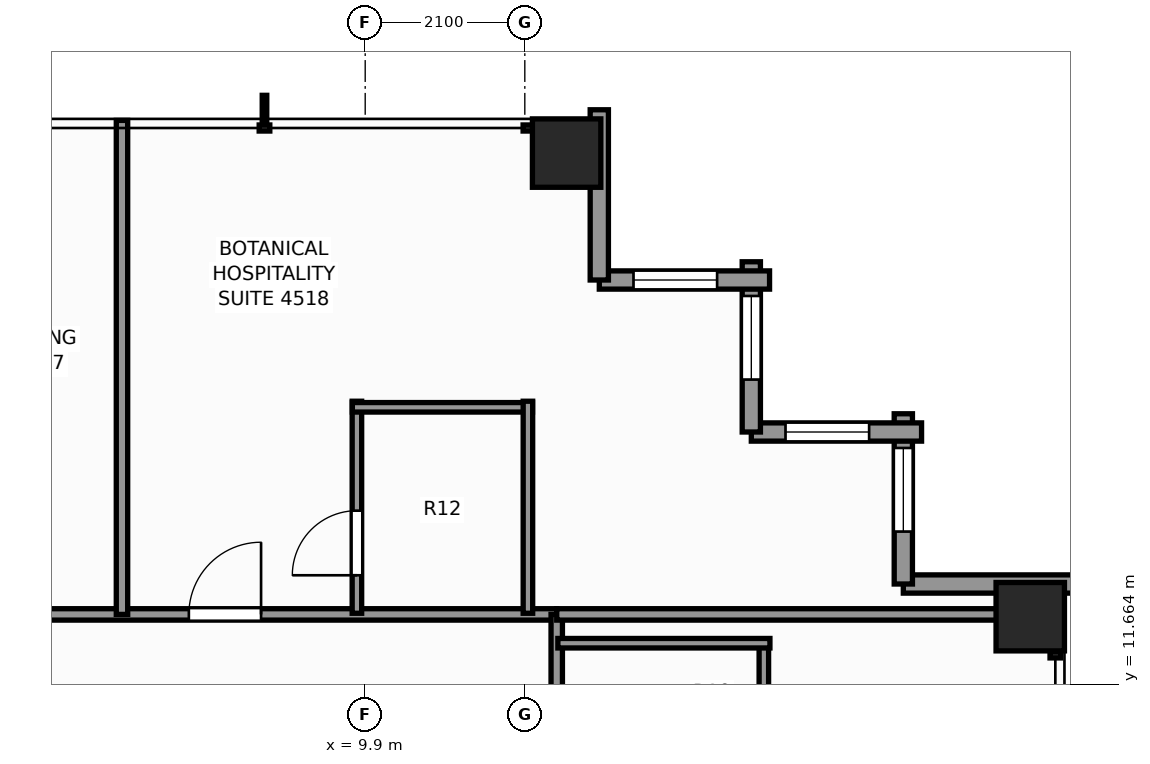
"""IFC4 building model, lengths in metres.
Left out: names, types, materials, properties, quantities, classifications, styles, units other than length and angle.
Written with IfcOpenShell. Run it as: python <this file> out.ifc"""

import sys

from ifc_helpers import new_model, si_unit, direction, frame, frame_2d, origin, origin_2d, place, context, subcontext, project, spatial, rectangle, extrude, element, fill, save


model = new_model("IFC4")
c1 = context("Model", 3, precision=1e-05, world=origin(), true_north=direction((0.0, 1.0)))
c2 = subcontext(c1, "Body", "Model", "MODEL_VIEW")
j1 = project(units=[si_unit("LENGTHUNIT", "METRE"), si_unit("PLANEANGLEUNIT", "RADIAN")], contexts=[c1])
p1 = place(None, origin())
s1 = spatial("IfcSite", under=j1, at=p1, CompositionType="ELEMENT")
p2 = place(p1, origin())
s2 = spatial("IfcBuilding", under=s1, at=p2, CompositionType="ELEMENT")
p3 = place(p2, frame((0.0, 0.0, 156.9)))
s3 = spatial("IfcBuildingStorey", under=s2, at=p3, CompositionType="ELEMENT", Elevation=156.9)
for number, where, z_axis, x_axis in (
    (1, (12.55, 18.65, 0.0), (0.0, 0.0, 1.0), (1.0, 0.0, 0.0)),
    (2, (18.65, 12.55, 0.0), (0.0, 0.0, 1.0), (1.0, 0.0, 0.0)),
):
    element("IfcColumn", number, at=place(p3, frame(where, z_axis=z_axis, x_axis=x_axis)), inside=s3, PredefinedType="COLUMN", context=c2, shape_type="SweptSolid", body=[
        extrude(rectangle(XDim=0.9, YDim=0.9, at=origin_2d()), origin(), (0.0, 0.0, 1.0), 3.3),
    ])
p4 = place(p3, frame((16.98, 12.98, 0.0), z_axis=(0.0, 0.0, 1.0), x_axis=(1.0, 0.0, 0.0)))
e3 = element("IfcWall", 3, at=p4, inside=s3, PredefinedType="STANDARD", context=c2, shape_type="SweptSolid", body=[
    extrude(rectangle(XDim=2.24, YDim=0.24, at=frame_2d((1.12, 0.0))), origin(), (0.0, 0.0, 1.0), 2.483),
])
p5 = place(p3, frame((16.98, 15.22, 0.0), z_axis=(0.0, 0.0, 1.0), x_axis=(0.0, -1.0, 0.0)))
e4 = element("IfcWall", 4, at=p5, inside=s3, PredefinedType="STANDARD", context=c2, shape_type="SweptSolid", body=[
    extrude(rectangle(XDim=2.24, YDim=0.24, at=frame_2d((1.12, 0.0))), origin(), (0.0, 0.0, 1.0), 2.483),
])
p6 = place(p5, frame((0.45, 0.0, 0.65)))
e5 = element("IfcOpeningElement", 5, at=p6, cuts=e4, PredefinedType="OPENING", context=c2, shape_type="SweptSolid", body=[
    extrude(rectangle(XDim=1.1, YDim=1.45, at=frame_2d((0.55, 0.725))), frame((0.0, 0.13, 0.0), z_axis=(0.0, -1.0, 0.0), x_axis=(1.0, 0.0, 0.0)), (0.0, 0.0, 1.0), 0.26),
])
p7 = place(p3, frame((14.98, 14.98, 0.0), z_axis=(0.0, 0.0, 1.0), x_axis=(1.0, 0.0, 0.0)))
e6 = element("IfcWall", 6, at=p7, inside=s3, PredefinedType="STANDARD", context=c2, shape_type="SweptSolid", body=[
    extrude(rectangle(XDim=2.24, YDim=0.24, at=frame_2d((1.12, 0.0))), origin(), (0.0, 0.0, 1.0), 2.483),
])
p8 = place(p7, frame((0.45, 0.0, 0.65)))
e7 = element("IfcOpeningElement", 7, at=p8, cuts=e6, PredefinedType="OPENING", context=c2, shape_type="SweptSolid", body=[
    extrude(rectangle(XDim=1.1, YDim=1.45, at=frame_2d((0.55, 0.725))), frame((0.0, 0.13, 0.0), z_axis=(0.0, -1.0, 0.0), x_axis=(1.0, 0.0, 0.0)), (0.0, 0.0, 1.0), 0.26),
])
p9 = place(p3, frame((14.98, 17.22, 0.0), z_axis=(0.0, 0.0, 1.0), x_axis=(0.0, -1.0, 0.0)))
e8 = element("IfcWall", 8, at=p9, inside=s3, PredefinedType="STANDARD", context=c2, shape_type="SweptSolid", body=[
    extrude(rectangle(XDim=2.24, YDim=0.24, at=frame_2d((1.12, 0.0))), origin(), (0.0, 0.0, 1.0), 2.483),
])
p10 = place(p9, frame((0.45, 0.0, 0.65)))
e9 = element("IfcOpeningElement", 9, at=p10, cuts=e8, PredefinedType="OPENING", context=c2, shape_type="SweptSolid", body=[
    extrude(rectangle(XDim=1.1, YDim=1.45, at=frame_2d((0.55, 0.725))), frame((0.0, 0.13, 0.0), z_axis=(0.0, -1.0, 0.0), x_axis=(1.0, 0.0, 0.0)), (0.0, 0.0, 1.0), 0.26),
])
p11 = place(p3, frame((12.98, 16.98, 0.0), z_axis=(0.0, 0.0, 1.0), x_axis=(1.0, 0.0, 0.0)))
e10 = element("IfcWall", 10, at=p11, inside=s3, PredefinedType="STANDARD", context=c2, shape_type="SweptSolid", body=[
    extrude(rectangle(XDim=2.24, YDim=0.24, at=frame_2d((1.12, 0.0))), origin(), (0.0, 0.0, 1.0), 2.483),
])
p12 = place(p11, frame((0.45, 0.0, 0.65)))
e11 = element("IfcOpeningElement", 11, at=p12, cuts=e10, PredefinedType="OPENING", context=c2, shape_type="SweptSolid", body=[
    extrude(rectangle(XDim=1.1, YDim=1.45, at=frame_2d((0.55, 0.725))), frame((0.0, 0.13, 0.0), z_axis=(0.0, -1.0, 0.0), x_axis=(1.0, 0.0, 0.0)), (0.0, 0.0, 1.0), 0.26),
])
p13 = place(p3, frame((12.98, 19.22, 0.0), z_axis=(0.0, 0.0, 1.0), x_axis=(0.0, -1.0, 0.0)))
e12 = element("IfcWall", 12, at=p13, inside=s3, PredefinedType="STANDARD", context=c2, shape_type="SweptSolid", body=[
    extrude(rectangle(XDim=2.24, YDim=0.24, at=frame_2d((1.12, 0.0))), origin(), (0.0, 0.0, 1.0), 2.483),
])
p14 = place(p3, frame((-12.42, 12.58, 0.0), z_axis=(0.0, 0.0, 1.0), x_axis=(1.0, 0.0, 0.0)))
e13 = element("IfcWall", 13, at=p14, inside=s3, PredefinedType="PARTITIONING", context=c2, shape_type="SweptSolid", body=[
    extrude(rectangle(XDim=24.84, YDim=0.15, at=frame_2d((12.42, 0.0))), origin(), (0.0, 0.0, 1.0), 2.389),
])
p15 = place(p14, frame((3.89, 0.0, 0.0)))
e14 = element("IfcOpeningElement", 14, at=p15, cuts=e13, PredefinedType="OPENING", context=c2, shape_type="SweptSolid", body=[
    extrude(rectangle(XDim=0.95, YDim=2.06, at=frame_2d((0.475, 1.03))), frame((0.0, 0.085, 0.0), z_axis=(0.0, -1.0, 0.0), x_axis=(1.0, 0.0, 0.0)), (0.0, 0.0, 1.0), 0.17),
])
p16 = place(p14, frame((8.806, 0.0, 0.0)))
e15 = element("IfcOpeningElement", 15, at=p16, cuts=e13, PredefinedType="OPENING", context=c2, shape_type="SweptSolid", body=[
    extrude(rectangle(XDim=0.9, YDim=2.06, at=frame_2d((0.45, 1.03))), frame((0.0, 0.085, 0.0), z_axis=(0.0, -1.0, 0.0), x_axis=(1.0, 0.0, 0.0)), (0.0, 0.0, 1.0), 0.17),
])
p17 = place(p14, frame((13.724, 0.0, 0.0)))
e16 = element("IfcOpeningElement", 16, at=p17, cuts=e13, PredefinedType="OPENING", context=c2, shape_type="SweptSolid", body=[
    extrude(rectangle(XDim=0.95, YDim=2.06, at=frame_2d((0.475, 1.03))), frame((0.0, 0.085, 0.0), z_axis=(0.0, -1.0, 0.0), x_axis=(1.0, 0.0, 0.0)), (0.0, 0.0, 1.0), 0.17),
])
p18 = place(p14, frame((16.886, 0.0, 0.0)))
e17 = element("IfcOpeningElement", 17, at=p18, cuts=e13, PredefinedType="OPENING", context=c2, shape_type="SweptSolid", body=[
    extrude(rectangle(XDim=0.9, YDim=2.06, at=frame_2d((0.45, 1.03))), frame((0.0, 0.085, 0.0), z_axis=(0.0, -1.0, 0.0), x_axis=(1.0, 0.0, 0.0)), (0.0, 0.0, 1.0), 0.17),
])
p19 = place(p14, frame((20.0, 0.0, 0.0)))
e18 = element("IfcOpeningElement", 18, at=p19, cuts=e13, PredefinedType="OPENING", context=c2, shape_type="SweptSolid", body=[
    extrude(rectangle(XDim=0.95, YDim=2.06, at=frame_2d((0.475, 1.03))), frame((0.0, 0.085, 0.0), z_axis=(0.0, -1.0, 0.0), x_axis=(1.0, 0.0, 0.0)), (0.0, 0.0, 1.0), 0.17),
])
p20 = place(p3, frame((12.42, -12.26, 0.0), z_axis=(0.0, 0.0, 1.0), x_axis=(0.0, 1.0, 0.0)))
e19 = element("IfcWall", 19, at=p20, inside=s3, PredefinedType="PARTITIONING", context=c2, shape_type="SweptSolid", body=[
    extrude(rectangle(XDim=24.84, YDim=0.15, at=frame_2d((12.42, 0.0))), origin(), (0.0, 0.0, 1.0), 2.389),
])
p21 = place(p20, frame((3.631, 0.0, 0.0)))
e20 = element("IfcOpeningElement", 20, at=p21, cuts=e19, PredefinedType="OPENING", context=c2, shape_type="SweptSolid", body=[
    extrude(rectangle(XDim=0.95, YDim=2.06, at=frame_2d((0.475, 1.03))), frame((0.0, 0.085, 0.0), z_axis=(0.0, -1.0, 0.0), x_axis=(1.0, 0.0, 0.0)), (0.0, 0.0, 1.0), 0.17),
])
p22 = place(p20, frame((5.797, 0.0, 0.0)))
e21 = element("IfcOpeningElement", 21, at=p22, cuts=e19, PredefinedType="OPENING", context=c2, shape_type="SweptSolid", body=[
    extrude(rectangle(XDim=0.9, YDim=2.06, at=frame_2d((0.45, 1.03))), frame((0.0, 0.085, 0.0), z_axis=(0.0, -1.0, 0.0), x_axis=(1.0, 0.0, 0.0)), (0.0, 0.0, 1.0), 0.17),
])
p23 = place(p20, frame((12.801, 0.0, 0.0)))
e22 = element("IfcOpeningElement", 22, at=p23, cuts=e19, PredefinedType="OPENING", context=c2, shape_type="SweptSolid", body=[
    extrude(rectangle(XDim=0.95, YDim=2.06, at=frame_2d((0.475, 1.03))), frame((0.0, 0.085, 0.0), z_axis=(0.0, -1.0, 0.0), x_axis=(1.0, 0.0, 0.0)), (0.0, 0.0, 1.0), 0.17),
])
p24 = place(p20, frame((18.217, 0.0, 0.0)))
e23 = element("IfcOpeningElement", 23, at=p24, cuts=e19, PredefinedType="OPENING", context=c2, shape_type="SweptSolid", body=[
    extrude(rectangle(XDim=0.95, YDim=2.06, at=frame_2d((0.475, 1.03))), frame((0.0, 0.085, 0.0), z_axis=(0.0, -1.0, 0.0), x_axis=(1.0, 0.0, 0.0)), (0.0, 0.0, 1.0), 0.17),
])
p25 = place(p20, frame((20.517, 0.0, 0.0)))
e24 = element("IfcOpeningElement", 24, at=p25, cuts=e19, PredefinedType="OPENING", context=c2, shape_type="SweptSolid", body=[
    extrude(rectangle(XDim=0.95, YDim=2.06, at=frame_2d((0.475, 1.03))), frame((0.0, 0.085, 0.0), z_axis=(0.0, -1.0, 0.0), x_axis=(1.0, 0.0, 0.0)), (0.0, 0.0, 1.0), 0.17),
])
p26 = place(p3, frame((12.42, 12.58, 0.0), z_axis=(0.0, 0.0, 1.0), x_axis=(1.0, 0.0, 0.0)))
e25 = element("IfcWall", 25, at=p26, inside=s3, PredefinedType="PARTITIONING", context=c2, shape_type="SweptSolid", body=[
    extrude(rectangle(XDim=6.66, YDim=0.15, at=frame_2d((3.33, 0.0))), origin(), (0.0, 0.0, 1.0), 2.389),
])
p27 = place(p3, frame((15.145, 9.891, 0.0), z_axis=(0.0, 0.0, 1.0), x_axis=(0.0, 1.0, 0.0)))
e26 = element("IfcWall", 26, at=p27, inside=s3, PredefinedType="PARTITIONING", context=c2, shape_type="SweptSolid", body=[
    extrude(rectangle(XDim=2.37, YDim=0.125, at=frame_2d((1.185, 0.0))), origin(), (0.0, 0.0, 1.0), 2.389),
])
p28 = place(p3, frame((12.435, 12.201, 0.0), z_axis=(0.0, 0.0, 1.0), x_axis=(1.0, 0.0, 0.0)))
e27 = element("IfcWall", 27, at=p28, inside=s3, PredefinedType="PARTITIONING", context=c2, shape_type="SweptSolid", body=[
    extrude(rectangle(XDim=2.79, YDim=0.125, at=frame_2d((1.395, 0.0))), origin(), (0.0, 0.0, 1.0), 3.1),
])
p29 = place(p3, frame((6.7, 12.58, 0.0), z_axis=(0.0, 0.0, 1.0), x_axis=(0.0, 1.0, 0.0)))
e28 = element("IfcWall", 28, at=p29, inside=s3, PredefinedType="PARTITIONING", context=c2, shape_type="SweptSolid", body=[
    extrude(rectangle(XDim=6.5, YDim=0.15, at=frame_2d((3.25, 0.0))), origin(), (0.0, 0.0, 1.0), 2.473),
])
p30 = place(p3, frame((9.791, 12.595, 0.0), z_axis=(0.0, 0.0, 1.0), x_axis=(0.0, 1.0, 0.0)))
e29 = element("IfcWall", 29, at=p30, inside=s3, PredefinedType="PARTITIONING", context=c2, shape_type="SweptSolid", body=[
    extrude(rectangle(XDim=2.79, YDim=0.125, at=frame_2d((1.395, 0.0))), origin(), (0.0, 0.0, 1.0), 3.1),
])
p31 = place(p30, frame((0.5, 0.0, 0.0)))
e30 = element("IfcOpeningElement", 30, at=p31, cuts=e29, PredefinedType="OPENING", context=c2, shape_type="SweptSolid", body=[
    extrude(rectangle(XDim=0.85, YDim=2.03, at=frame_2d((0.425, 1.015))), frame((0.0, 0.073, 0.0), z_axis=(0.0, -1.0, 0.0), x_axis=(1.0, 0.0, 0.0)), (0.0, 0.0, 1.0), 0.145),
])
p32 = place(p3, frame((9.731, 15.305, 0.0), z_axis=(0.0, 0.0, 1.0), x_axis=(1.0, 0.0, 0.0)))
e31 = element("IfcWall", 31, at=p32, inside=s3, PredefinedType="PARTITIONING", context=c2, shape_type="SweptSolid", body=[
    extrude(rectangle(XDim=2.37, YDim=0.125, at=frame_2d((1.185, 0.0))), origin(), (0.0, 0.0, 1.0), 2.389),
])
p33 = place(p3, frame((12.041, 12.595, 0.0), z_axis=(0.0, 0.0, 1.0), x_axis=(0.0, 1.0, 0.0)))
e32 = element("IfcWall", 32, at=p33, inside=s3, PredefinedType="PARTITIONING", context=c2, shape_type="SweptSolid", body=[
    extrude(rectangle(XDim=2.79, YDim=0.125, at=frame_2d((1.395, 0.0))), origin(), (0.0, 0.0, 1.0), 3.1),
])
p34 = place(p6, origin())
e33 = element("IfcWindow", 33, at=p34, inside=s3, PartitioningType="SINGLE_PANEL", PredefinedType="WINDOW", context=c2, shape_type="SweptSolid", body=[
    extrude(rectangle(XDim=1.1, YDim=1.45, at=frame_2d((0.55, 0.725))), frame((0.0, 0.03, 0.0), z_axis=(0.0, -1.0, 0.0), x_axis=(1.0, 0.0, 0.0)), (0.0, 0.0, 1.0), 0.06),
])
fill(e5, e33)
p35 = place(p8, origin())
e34 = element("IfcWindow", 34, at=p35, inside=s3, PartitioningType="SINGLE_PANEL", PredefinedType="WINDOW", context=c2, shape_type="SweptSolid", body=[
    extrude(rectangle(XDim=1.1, YDim=1.45, at=frame_2d((0.55, 0.725))), frame((0.0, 0.03, 0.0), z_axis=(0.0, -1.0, 0.0), x_axis=(1.0, 0.0, 0.0)), (0.0, 0.0, 1.0), 0.06),
])
fill(e7, e34)
p36 = place(p10, origin())
e35 = element("IfcWindow", 35, at=p36, inside=s3, PartitioningType="SINGLE_PANEL", PredefinedType="WINDOW", context=c2, shape_type="SweptSolid", body=[
    extrude(rectangle(XDim=1.1, YDim=1.45, at=frame_2d((0.55, 0.725))), frame((0.0, 0.03, 0.0), z_axis=(0.0, -1.0, 0.0), x_axis=(1.0, 0.0, 0.0)), (0.0, 0.0, 1.0), 0.06),
])
fill(e9, e35)
p37 = place(p12, origin())
e36 = element("IfcWindow", 36, at=p37, inside=s3, PartitioningType="SINGLE_PANEL", PredefinedType="WINDOW", context=c2, shape_type="SweptSolid", body=[
    extrude(rectangle(XDim=1.1, YDim=1.45, at=frame_2d((0.55, 0.725))), frame((0.0, 0.03, 0.0), z_axis=(0.0, -1.0, 0.0), x_axis=(1.0, 0.0, 0.0)), (0.0, 0.0, 1.0), 0.06),
])
fill(e11, e36)
p38 = place(p31, origin())
e37 = element("IfcDoor", 37, at=p38, inside=s3, OperationType="SINGLE_SWING_LEFT", PredefinedType="DOOR", context=c2, shape_type="SweptSolid", body=[
    extrude(rectangle(XDim=0.85, YDim=2.03, at=frame_2d((0.425, 1.015))), frame((0.0, 0.025, 0.0), z_axis=(0.0, -1.0, 0.0), x_axis=(1.0, 0.0, 0.0)), (0.0, 0.0, 1.0), 0.05),
])
fill(e30, e37)
p39 = place(p19, origin())
e38 = element("IfcDoor", 38, at=p39, inside=s3, OperationType="SINGLE_SWING_RIGHT", PredefinedType="DOOR", context=c2, shape_type="SweptSolid", body=[
    extrude(rectangle(XDim=0.95, YDim=2.06, at=frame_2d((0.475, 1.03))), frame((0.0, 0.025, 0.0), z_axis=(0.0, -1.0, 0.0), x_axis=(1.0, 0.0, 0.0)), (0.0, 0.0, 1.0), 0.05),
])
fill(e18, e38)
save(model, sys.argv[1])
